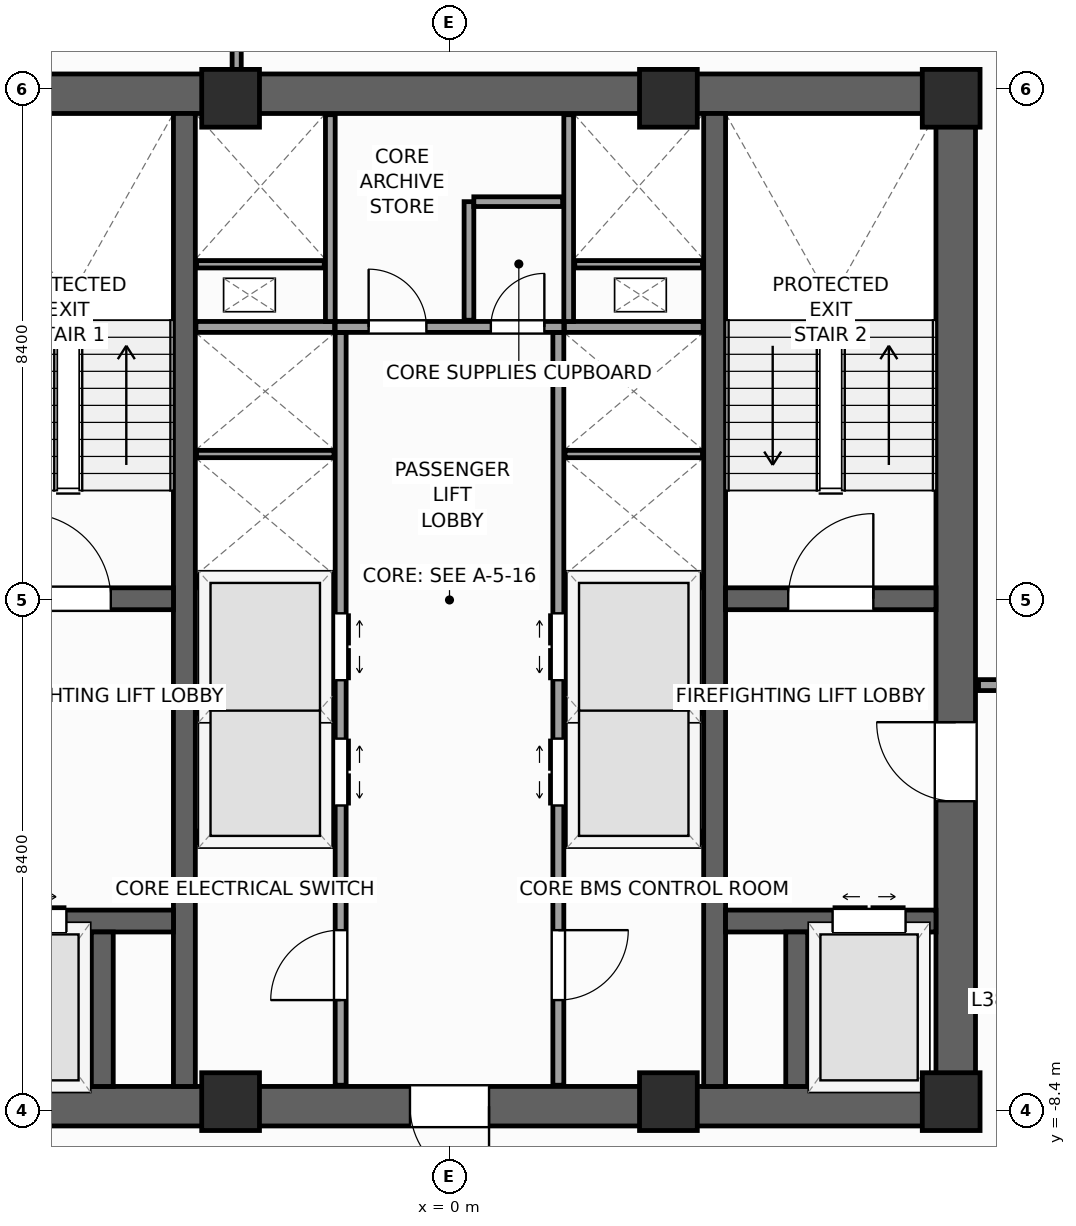
"""IFC4 building model, lengths in metres.
Left out: names, types, materials, properties, quantities, classifications, styles, units other than length and angle.
Written with IfcOpenShell. Run it as: python <this file> out.ifc"""

import sys

from ifc_helpers import new_model, si_unit, direction, frame, frame_2d, origin, origin_2d, place, context, subcontext, project, spatial, rectangle, extrude, source, transform, mapped, element, fill, save


model = new_model("IFC4")
c1 = context("Model", 3, precision=1e-05, world=origin(), true_north=direction((0.0, 1.0)))
c2 = subcontext(c1, "Body", "Model", "MODEL_VIEW")
j1 = project(units=[si_unit("LENGTHUNIT", "METRE"), si_unit("PLANEANGLEUNIT", "RADIAN")], contexts=[c1])
p1 = place(None, origin())
s1 = spatial("IfcSite", under=j1, at=p1, CompositionType="ELEMENT")
p2 = place(p1, origin())
s2 = spatial("IfcBuilding", under=s1, at=p2, CompositionType="ELEMENT")
p3 = place(p2, frame((0.0, 0.0, 160.4)))
s3 = spatial("IfcBuildingStorey", under=s2, at=p3, CompositionType="ELEMENT", Elevation=160.4)
p4 = place(p3, frame((-8.65, -8.325, 0.0), z_axis=(0.0, 0.0, 1.0), x_axis=(1.0, 0.0, 0.0)))
e1 = element("IfcWall", 1, at=p4, inside=s3, PredefinedType="SHEAR", context=c2, shape_type="SweptSolid", body=[
    extrude(rectangle(XDim=17.3, YDim=0.65, at=frame_2d((8.65, 0.0))), origin(), (0.0, 0.0, 1.0), 4.0),
])
p5 = place(p4, frame((8.0, 0.0, 0.0)))
e2 = element("IfcOpeningElement", 2, at=p5, cuts=e1, PredefinedType="OPENING", context=c2, shape_type="SweptSolid", body=[
    extrude(rectangle(XDim=1.3, YDim=2.2, at=frame_2d((0.65, 1.1))), frame((0.0, 0.335, 0.0), z_axis=(0.0, -1.0, 0.0), x_axis=(1.0, 0.0, 0.0)), (0.0, 0.0, 1.0), 0.67),
])
p6 = place(p3, frame((-8.65, 8.325, 0.0), z_axis=(0.0, 0.0, 1.0), x_axis=(1.0, 0.0, 0.0)))
e3 = element("IfcWall", 3, at=p6, inside=s3, PredefinedType="SHEAR", context=c2, shape_type="SweptSolid", body=[
    extrude(rectangle(XDim=17.3, YDim=0.65, at=frame_2d((8.65, 0.0))), origin(), (0.0, 0.0, 1.0), 4.0),
])
p7 = place(p3, frame((8.325, -8.0, 0.0), z_axis=(0.0, 0.0, 1.0), x_axis=(0.0, 1.0, 0.0)))
e4 = element("IfcWall", 4, at=p7, inside=s3, PredefinedType="SHEAR", context=c2, shape_type="SweptSolid", body=[
    extrude(rectangle(XDim=16.0, YDim=0.65, at=frame_2d((8.0, 0.0))), origin(), (0.0, 0.0, 1.0), 4.0),
])
p8 = place(p7, frame((4.69, 0.0, 0.0)))
e5 = element("IfcOpeningElement", 5, at=p8, cuts=e4, PredefinedType="OPENING", context=c2, shape_type="SweptSolid", body=[
    extrude(rectangle(XDim=1.3, YDim=2.2, at=frame_2d((0.65, 1.1))), frame((0.0, 0.335, 0.0), z_axis=(0.0, -1.0, 0.0), x_axis=(1.0, 0.0, 0.0)), (0.0, 0.0, 1.0), 0.67),
])
for number, where, z_axis, x_axis in (
    (6, (-4.36, -8.0, 0.0), (0.0, 0.0, 1.0), (0.0, 1.0, 0.0)),
    (7, (4.36, -8.0, 0.0), (0.0, 0.0, 1.0), (0.0, 1.0, 0.0)),
):
    element("IfcWall", number, at=place(p3, frame(where, z_axis=z_axis, x_axis=x_axis)), inside=s3, PredefinedType="SHEAR", context=c2, shape_type="SweptSolid", body=[
        extrude(rectangle(XDim=16.0, YDim=0.36, at=frame_2d((8.0, 0.0))), origin(), (0.0, 0.0, 1.0), 4.0),
    ])
p9 = place(p3, frame((-8.0, 0.02, 0.0), z_axis=(0.0, 0.0, 1.0), x_axis=(1.0, 0.0, 0.0)))
e8 = element("IfcWall", 8, at=p9, inside=s3, PredefinedType="SHEAR", context=c2, shape_type="SweptSolid", body=[
    extrude(rectangle(XDim=3.46, YDim=0.36, at=frame_2d((1.73, 0.0))), origin(), (0.0, 0.0, 1.0), 4.0),
])
p10 = place(p9, frame((1.03, 0.0, 0.0)))
e9 = element("IfcOpeningElement", 9, at=p10, cuts=e8, PredefinedType="OPENING", context=c2, shape_type="SweptSolid", body=[
    extrude(rectangle(XDim=1.4, YDim=2.2, at=frame_2d((0.7, 1.1))), frame((0.0, 0.19, 0.0), z_axis=(0.0, -1.0, 0.0), x_axis=(1.0, 0.0, 0.0)), (0.0, 0.0, 1.0), 0.38),
])
p11 = place(p3, frame((4.54, 0.02, 0.0), z_axis=(0.0, 0.0, 1.0), x_axis=(1.0, 0.0, 0.0)))
e10 = element("IfcWall", 10, at=p11, inside=s3, PredefinedType="SHEAR", context=c2, shape_type="SweptSolid", body=[
    extrude(rectangle(XDim=3.46, YDim=0.36, at=frame_2d((1.73, 0.0))), origin(), (0.0, 0.0, 1.0), 4.0),
])
p12 = place(p11, frame((1.03, 0.0, 0.0)))
e11 = element("IfcOpeningElement", 11, at=p12, cuts=e10, PredefinedType="OPENING", context=c2, shape_type="SweptSolid", body=[
    extrude(rectangle(XDim=1.4, YDim=2.2, at=frame_2d((0.7, 1.1))), frame((0.0, 0.19, 0.0), z_axis=(0.0, -1.0, 0.0), x_axis=(1.0, 0.0, 0.0)), (0.0, 0.0, 1.0), 0.38),
])
p13 = place(p3, frame((-8.0, -5.28, 0.0), z_axis=(0.0, 0.0, 1.0), x_axis=(1.0, 0.0, 0.0)))
e12 = element("IfcWall", 12, at=p13, inside=s3, PredefinedType="SHEAR", context=c2, shape_type="SweptSolid", body=[
    extrude(rectangle(XDim=3.46, YDim=0.36, at=frame_2d((1.73, 0.0))), origin(), (0.0, 0.0, 1.0), 4.0),
])
p14 = place(p13, frame((0.5, 0.0, 0.0)))
e13 = element("IfcOpeningElement", 13, at=p14, cuts=e12, PredefinedType="OPENING", context=c2, shape_type="SweptSolid", body=[
    extrude(rectangle(XDim=1.2, YDim=2.25, at=frame_2d((0.6, 1.125))), frame((0.0, 0.19, 0.0), z_axis=(0.0, -1.0, 0.0), x_axis=(1.0, 0.0, 0.0)), (0.0, 0.0, 1.0), 0.38),
])
p15 = place(p3, frame((4.54, -5.28, 0.0), z_axis=(0.0, 0.0, 1.0), x_axis=(1.0, 0.0, 0.0)))
e14 = element("IfcWall", 14, at=p15, inside=s3, PredefinedType="SHEAR", context=c2, shape_type="SweptSolid", body=[
    extrude(rectangle(XDim=3.46, YDim=0.36, at=frame_2d((1.73, 0.0))), origin(), (0.0, 0.0, 1.0), 4.0),
])
p16 = place(p15, frame((1.76, 0.0, 0.0)))
e15 = element("IfcOpeningElement", 15, at=p16, cuts=e14, PredefinedType="OPENING", context=c2, shape_type="SweptSolid", body=[
    extrude(rectangle(XDim=1.2, YDim=2.25, at=frame_2d((0.6, 1.125))), frame((0.0, 0.19, 0.0), z_axis=(0.0, -1.0, 0.0), x_axis=(1.0, 0.0, 0.0)), (0.0, 0.0, 1.0), 0.38),
])
for number, where, z_axis, x_axis in (
    (16, (-5.71, -8.0, 0.0), (0.0, 0.0, 1.0), (0.0, 1.0, 0.0)),
    (17, (5.71, -8.0, 0.0), (0.0, 0.0, 1.0), (0.0, 1.0, 0.0)),
):
    element("IfcWall", number, at=place(p3, frame(where, z_axis=z_axis, x_axis=x_axis)), inside=s3, PredefinedType="SHEAR", context=c2, shape_type="SweptSolid", body=[
        extrude(rectangle(XDim=2.54, YDim=0.36, at=frame_2d((1.27, 0.0))), origin(), (0.0, 0.0, 1.0), 4.0),
    ])
m1 = source(origin(), c2, "Body", "SweptSolid", [
    extrude(rectangle(XDim=0.95, YDim=0.95, at=origin_2d()), origin(), (0.0, 0.0, 1.0), 4.0),
])
for number, where, z_axis, x_axis in (
    (18, (8.25, -8.25, 0.0), (0.0, 0.0, 1.0), (1.0, 0.0, 0.0)),
    (19, (8.25, 8.25, 0.0), (0.0, 0.0, 1.0), (1.0, 0.0, 0.0)),
    (20, (-3.6, -8.25, 0.0), (0.0, 0.0, 1.0), (1.0, 0.0, 0.0)),
    (21, (3.6, -8.25, 0.0), (0.0, 0.0, 1.0), (1.0, 0.0, 0.0)),
    (22, (-3.6, 8.25, 0.0), (0.0, 0.0, 1.0), (1.0, 0.0, 0.0)),
    (23, (3.6, 8.25, 0.0), (0.0, 0.0, 1.0), (1.0, 0.0, 0.0)),
):
    element("IfcColumn", number, at=place(p3, frame(where, z_axis=z_axis, x_axis=x_axis)), inside=s3, PredefinedType="PILASTER", context=c2, shape_type="MappedRepresentation", body=[
        mapped(m1, transform((0.0, 0.0, 0.0), scale=1.0)),
    ])
p17 = place(p3, frame((-1.79, -7.98, 0.0), z_axis=(0.0, 0.0, 1.0), x_axis=(0.0, 1.0, 0.0)))
e24 = element("IfcWall", 24, at=p17, inside=s3, PredefinedType="PARTITIONING", context=c2, shape_type="SweptSolid", body=[
    extrude(rectangle(XDim=12.38, YDim=0.18, at=frame_2d((6.19, 0.0))), origin(), (0.0, 0.0, 1.0), 3.74),
])
p18 = place(p17, frame((4.6, 0.0, 0.0)))
e25 = element("IfcOpeningElement", 25, at=p18, cuts=e24, PredefinedType="OPENING", context=c2, shape_type="SweptSolid", body=[
    extrude(rectangle(XDim=1.1, YDim=2.2, at=frame_2d((0.55, 1.1))), frame((0.0, 0.1, 0.0), z_axis=(0.0, -1.0, 0.0), x_axis=(1.0, 0.0, 0.0)), (0.0, 0.0, 1.0), 0.2),
])
p19 = place(p17, frame((6.66, 0.0, 0.0)))
e26 = element("IfcOpeningElement", 26, at=p19, cuts=e24, PredefinedType="OPENING", context=c2, shape_type="SweptSolid", body=[
    extrude(rectangle(XDim=1.1, YDim=2.2, at=frame_2d((0.55, 1.1))), frame((0.0, 0.1, 0.0), z_axis=(0.0, -1.0, 0.0), x_axis=(1.0, 0.0, 0.0)), (0.0, 0.0, 1.0), 0.2),
])
p20 = place(p17, frame((1.4, 0.0, 0.0)))
e27 = element("IfcOpeningElement", 27, at=p20, cuts=e24, PredefinedType="OPENING", context=c2, shape_type="SweptSolid", body=[
    extrude(rectangle(XDim=1.15, YDim=2.25, at=frame_2d((0.575, 1.125))), frame((0.0, 0.1, 0.0), z_axis=(0.0, -1.0, 0.0), x_axis=(1.0, 0.0, 0.0)), (0.0, 0.0, 1.0), 0.2),
])
p21 = place(p3, frame((1.79, -7.98, 0.0), z_axis=(0.0, 0.0, 1.0), x_axis=(0.0, 1.0, 0.0)))
e28 = element("IfcWall", 28, at=p21, inside=s3, PredefinedType="PARTITIONING", context=c2, shape_type="SweptSolid", body=[
    extrude(rectangle(XDim=12.38, YDim=0.18, at=frame_2d((6.19, 0.0))), origin(), (0.0, 0.0, 1.0), 3.74),
])
p22 = place(p21, frame((4.6, 0.0, 0.0)))
e29 = element("IfcOpeningElement", 29, at=p22, cuts=e28, PredefinedType="OPENING", context=c2, shape_type="SweptSolid", body=[
    extrude(rectangle(XDim=1.1, YDim=2.2, at=frame_2d((0.55, 1.1))), frame((0.0, 0.1, 0.0), z_axis=(0.0, -1.0, 0.0), x_axis=(1.0, 0.0, 0.0)), (0.0, 0.0, 1.0), 0.2),
])
p23 = place(p21, frame((6.66, 0.0, 0.0)))
e30 = element("IfcOpeningElement", 30, at=p23, cuts=e28, PredefinedType="OPENING", context=c2, shape_type="SweptSolid", body=[
    extrude(rectangle(XDim=1.1, YDim=2.2, at=frame_2d((0.55, 1.1))), frame((0.0, 0.1, 0.0), z_axis=(0.0, -1.0, 0.0), x_axis=(1.0, 0.0, 0.0)), (0.0, 0.0, 1.0), 0.2),
])
p24 = place(p21, frame((1.4, 0.0, 0.0)))
e31 = element("IfcOpeningElement", 31, at=p24, cuts=e28, PredefinedType="OPENING", context=c2, shape_type="SweptSolid", body=[
    extrude(rectangle(XDim=1.15, YDim=2.25, at=frame_2d((0.575, 1.125))), frame((0.0, 0.1, 0.0), z_axis=(0.0, -1.0, 0.0), x_axis=(1.0, 0.0, 0.0)), (0.0, 0.0, 1.0), 0.2),
])
p25 = place(p3, frame((-1.88, 4.49, 0.0), z_axis=(0.0, 0.0, 1.0), x_axis=(1.0, 0.0, 0.0)))
e32 = element("IfcWall", 32, at=p25, inside=s3, PredefinedType="PARTITIONING", context=c2, shape_type="SweptSolid", body=[
    extrude(rectangle(XDim=3.76, YDim=0.18, at=frame_2d((1.88, 0.0))), origin(), (0.0, 0.0, 1.0), 3.74),
])
p26 = place(p25, frame((0.55, 0.0, 0.0)))
e33 = element("IfcOpeningElement", 33, at=p26, cuts=e32, PredefinedType="OPENING", context=c2, shape_type="SweptSolid", body=[
    extrude(rectangle(XDim=0.95, YDim=2.1, at=frame_2d((0.475, 1.05))), frame((0.0, 0.1, 0.0), z_axis=(0.0, -1.0, 0.0), x_axis=(1.0, 0.0, 0.0)), (0.0, 0.0, 1.0), 0.2),
])
p27 = place(p25, frame((2.56, 0.0, 0.0)))
e34 = element("IfcOpeningElement", 34, at=p27, cuts=e32, PredefinedType="OPENING", context=c2, shape_type="SweptSolid", body=[
    extrude(rectangle(XDim=0.88, YDim=2.1, at=frame_2d((0.44, 1.05))), frame((0.0, 0.1, 0.0), z_axis=(0.0, -1.0, 0.0), x_axis=(1.0, 0.0, 0.0)), (0.0, 0.0, 1.0), 0.2),
])
for number, where, z_axis, x_axis in (
    (35, (-4.17, -3.9, 0.0), (0.0, 0.0, 1.0), (1.0, 0.0, 0.0)),
    (36, (1.89, -3.9, 0.0), (0.0, 0.0, 1.0), (1.0, 0.0, 0.0)),
    (37, (-4.17, 0.3, 0.0), (0.0, 0.0, 1.0), (1.0, 0.0, 0.0)),
    (38, (1.89, 0.3, 0.0), (0.0, 0.0, 1.0), (1.0, 0.0, 0.0)),
    (39, (-4.17, 4.49, 0.0), (0.0, 0.0, 1.0), (1.0, 0.0, 0.0)),
    (40, (1.89, 4.49, 0.0), (0.0, 0.0, 1.0), (1.0, 0.0, 0.0)),
):
    element("IfcWall", number, at=place(p3, frame(where, z_axis=z_axis, x_axis=x_axis)), inside=s3, PredefinedType="PARTITIONING", context=c2, shape_type="SweptSolid", body=[
        extrude(rectangle(XDim=2.28, YDim=0.18, at=frame_2d((1.14, 0.0))), origin(), (0.0, 0.0, 1.0), 3.74),
    ])
for number, where, z_axis, x_axis in (
    (41, (-4.16, -1.8, 0.0), (0.0, 0.0, 1.0), (1.0, 0.0, 0.0)),
    (42, (1.9, -1.8, 0.0), (0.0, 0.0, 1.0), (1.0, 0.0, 0.0)),
    (43, (-4.16, 2.4, 0.0), (0.0, 0.0, 1.0), (1.0, 0.0, 0.0)),
    (44, (1.9, 2.4, 0.0), (0.0, 0.0, 1.0), (1.0, 0.0, 0.0)),
):
    element("IfcWall", number, at=place(p3, frame(where, z_axis=z_axis, x_axis=x_axis)), inside=s3, PredefinedType="PARTITIONING", context=c2, shape_type="SweptSolid", body=[
        extrude(rectangle(XDim=2.26, YDim=0.12, at=frame_2d((1.13, 0.0))), origin(), (0.0, 0.0, 1.0), 3.74),
    ])
for number, where, z_axis, x_axis in (
    (45, (-1.96, 4.58, 0.0), (0.0, 0.0, 1.0), (0.0, 1.0, 0.0)),
    (46, (1.96, 4.58, 0.0), (0.0, 0.0, 1.0), (0.0, 1.0, 0.0)),
):
    element("IfcWall", number, at=place(p3, frame(where, z_axis=z_axis, x_axis=x_axis)), inside=s3, PredefinedType="PARTITIONING", context=c2, shape_type="SweptSolid", body=[
        extrude(rectangle(XDim=3.4, YDim=0.16, at=frame_2d((1.7, 0.0))), origin(), (0.0, 0.0, 1.0), 3.74),
    ])
for number, where, z_axis, x_axis in (
    (47, (-4.16, 5.52, 0.0), (0.0, 0.0, 1.0), (1.0, 0.0, 0.0)),
    (48, (2.06, 5.52, 0.0), (0.0, 0.0, 1.0), (1.0, 0.0, 0.0)),
):
    element("IfcWall", number, at=place(p3, frame(where, z_axis=z_axis, x_axis=x_axis)), inside=s3, PredefinedType="PARTITIONING", context=c2, shape_type="SweptSolid", body=[
        extrude(rectangle(XDim=2.1, YDim=0.12, at=frame_2d((1.05, 0.0))), origin(), (0.0, 0.0, 1.0), 3.74),
    ])
p28 = place(p3, frame((0.32, 4.6, 0.0), z_axis=(0.0, 0.0, 1.0), x_axis=(0.0, 1.0, 0.0)))
e49 = element("IfcWall", 49, at=p28, inside=s3, PredefinedType="PARTITIONING", context=c2, shape_type="SweptSolid", body=[
    extrude(rectangle(XDim=1.95, YDim=0.16, at=frame_2d((0.975, 0.0))), origin(), (0.0, 0.0, 1.0), 3.74),
])
p29 = place(p3, frame((0.4, 6.55, 0.0), z_axis=(0.0, 0.0, 1.0), x_axis=(1.0, 0.0, 0.0)))
e50 = element("IfcWall", 50, at=p29, inside=s3, PredefinedType="PARTITIONING", context=c2, shape_type="SweptSolid", body=[
    extrude(rectangle(XDim=1.46, YDim=0.16, at=frame_2d((0.73, 0.0))), origin(), (0.0, 0.0, 1.0), 3.74),
])
p30 = place(p3, frame((8.7, -1.4, 0.0), z_axis=(0.0, 0.0, 1.0), x_axis=(1.0, 0.0, 0.0)))
e51 = element("IfcWall", 51, at=p30, inside=s3, PredefinedType="PARTITIONING", context=c2, shape_type="SweptSolid", body=[
    extrude(rectangle(XDim=1.75, YDim=0.18, at=frame_2d((0.875, 0.0))), origin(), (0.0, 0.0, 1.0), 3.74),
])
p31 = place(p30, frame((0.325, 0.0, 0.0)))
e52 = element("IfcOpeningElement", 52, at=p31, cuts=e51, PredefinedType="OPENING", context=c2, shape_type="SweptSolid", body=[
    extrude(rectangle(XDim=1.1, YDim=2.2, at=frame_2d((0.55, 1.1))), frame((0.0, 0.1, 0.0), z_axis=(0.0, -1.0, 0.0), x_axis=(1.0, 0.0, 0.0)), (0.0, 0.0, 1.0), 0.2),
])
p32 = place(p3, frame((-3.5, 8.655, 0.0), z_axis=(0.0, 0.0, 1.0), x_axis=(0.0, 1.0, 0.0)))
e53 = element("IfcWall", 53, at=p32, inside=s3, PredefinedType="PARTITIONING", context=c2, shape_type="SweptSolid", body=[
    extrude(rectangle(XDim=19.411, YDim=0.15, at=frame_2d((9.706, 0.0))), origin(), (0.0, 0.0, 1.0), 3.74),
])
m2 = source(origin(), c2, "Body", "SweptSolid", [
    extrude(rectangle(XDim=1.4, YDim=2.2, at=frame_2d((0.7, 1.1))), frame((0.0, 0.025, 0.0), z_axis=(0.0, -1.0, 0.0), x_axis=(1.0, 0.0, 0.0)), (0.0, 0.0, 1.0), 0.05),
])
p33 = place(p10, origin())
e54 = element("IfcDoor", 54, at=p33, inside=s3, OperationType="SINGLE_SWING_LEFT", PredefinedType="DOOR", context=c2, shape_type="MappedRepresentation", body=[
    mapped(m2, transform((0.0, 0.0, 0.0), scale=1.0)),
])
fill(e9, e54)
p34 = place(p12, origin())
e55 = element("IfcDoor", 55, at=p34, inside=s3, OperationType="SINGLE_SWING_RIGHT", PredefinedType="DOOR", context=c2, shape_type="MappedRepresentation", body=[
    mapped(m2, transform((0.0, 0.0, 0.0), scale=1.0)),
])
fill(e11, e55)
m3 = source(origin(), c2, "Body", "SweptSolid", [
    extrude(rectangle(XDim=1.3, YDim=2.2, at=frame_2d((0.65, 1.1))), frame((0.0, 0.025, 0.0), z_axis=(0.0, -1.0, 0.0), x_axis=(1.0, 0.0, 0.0)), (0.0, 0.0, 1.0), 0.05),
])
p35 = place(p8, origin())
e56 = element("IfcDoor", 56, at=p35, inside=s3, OperationType="SINGLE_SWING_RIGHT", PredefinedType="DOOR", context=c2, shape_type="MappedRepresentation", body=[
    mapped(m3, transform((0.0, 0.0, 0.0), scale=1.0)),
])
fill(e5, e56)
p36 = place(p5, frame((1.3, 0.0, 0.0), z_axis=(0.0, 0.0, 1.0), x_axis=(-1.0, 0.0, 0.0)))
e57 = element("IfcDoor", 57, at=p36, inside=s3, OperationType="SINGLE_SWING_RIGHT", PredefinedType="DOOR", context=c2, shape_type="MappedRepresentation", body=[
    mapped(m3, transform((0.0, 0.0, 0.0), scale=1.0)),
])
fill(e2, e57)
m4 = source(origin(), c2, "Body", "SweptSolid", [
    extrude(rectangle(XDim=1.2, YDim=2.25, at=frame_2d((0.6, 1.125))), frame((0.0, 0.025, 0.0), z_axis=(0.0, -1.0, 0.0), x_axis=(1.0, 0.0, 0.0)), (0.0, 0.0, 1.0), 0.05),
])
p37 = place(p14, origin())
e58 = element("IfcDoor", 58, at=p37, inside=s3, OperationType="DOUBLE_DOOR_SLIDING", PredefinedType="DOOR", context=c2, shape_type="MappedRepresentation", body=[
    mapped(m4, transform((0.0, 0.0, 0.0), scale=1.0)),
])
fill(e13, e58)
p38 = place(p16, origin())
e59 = element("IfcDoor", 59, at=p38, inside=s3, OperationType="DOUBLE_DOOR_SLIDING", PredefinedType="DOOR", context=c2, shape_type="MappedRepresentation", body=[
    mapped(m4, transform((0.0, 0.0, 0.0), scale=1.0)),
])
fill(e15, e59)
m5 = source(origin(), c2, "Body", "SweptSolid", [
    extrude(rectangle(XDim=1.1, YDim=2.2, at=frame_2d((0.55, 1.1))), frame((0.0, 0.025, 0.0), z_axis=(0.0, -1.0, 0.0), x_axis=(1.0, 0.0, 0.0)), (0.0, 0.0, 1.0), 0.05),
])
p39 = place(p18, frame((1.1, 0.0, 0.0), z_axis=(0.0, 0.0, 1.0), x_axis=(-1.0, 0.0, 0.0)))
e60 = element("IfcDoor", 60, at=p39, inside=s3, OperationType="DOUBLE_DOOR_SLIDING", PredefinedType="DOOR", context=c2, shape_type="MappedRepresentation", body=[
    mapped(m5, transform((0.0, 0.0, 0.0), scale=1.0)),
])
fill(e25, e60)
p40 = place(p19, frame((1.1, 0.0, 0.0), z_axis=(0.0, 0.0, 1.0), x_axis=(-1.0, 0.0, 0.0)))
e61 = element("IfcDoor", 61, at=p40, inside=s3, OperationType="DOUBLE_DOOR_SLIDING", PredefinedType="DOOR", context=c2, shape_type="MappedRepresentation", body=[
    mapped(m5, transform((0.0, 0.0, 0.0), scale=1.0)),
])
fill(e26, e61)
p41 = place(p22, origin())
e62 = element("IfcDoor", 62, at=p41, inside=s3, OperationType="DOUBLE_DOOR_SLIDING", PredefinedType="DOOR", context=c2, shape_type="MappedRepresentation", body=[
    mapped(m5, transform((0.0, 0.0, 0.0), scale=1.0)),
])
fill(e29, e62)
p42 = place(p23, origin())
e63 = element("IfcDoor", 63, at=p42, inside=s3, OperationType="DOUBLE_DOOR_SLIDING", PredefinedType="DOOR", context=c2, shape_type="MappedRepresentation", body=[
    mapped(m5, transform((0.0, 0.0, 0.0), scale=1.0)),
])
fill(e30, e63)
m6 = source(origin(), c2, "Body", "SweptSolid", [
    extrude(rectangle(XDim=1.15, YDim=2.25, at=frame_2d((0.575, 1.125))), frame((0.0, 0.025, 0.0), z_axis=(0.0, -1.0, 0.0), x_axis=(1.0, 0.0, 0.0)), (0.0, 0.0, 1.0), 0.05),
])
p43 = place(p20, origin())
e64 = element("IfcDoor", 64, at=p43, inside=s3, OperationType="SINGLE_SWING_LEFT", PredefinedType="DOOR", context=c2, shape_type="MappedRepresentation", body=[
    mapped(m6, transform((0.0, 0.0, 0.0), scale=1.0)),
])
fill(e27, e64)
p44 = place(p24, frame((1.15, 0.0, 0.0), z_axis=(0.0, 0.0, 1.0), x_axis=(-1.0, 0.0, 0.0)))
e65 = element("IfcDoor", 65, at=p44, inside=s3, OperationType="SINGLE_SWING_RIGHT", PredefinedType="DOOR", context=c2, shape_type="MappedRepresentation", body=[
    mapped(m6, transform((0.0, 0.0, 0.0), scale=1.0)),
])
fill(e31, e65)
m7 = source(origin(), c2, "Body", "SweptSolid", [
    extrude(rectangle(XDim=0.95, YDim=2.1, at=frame_2d((0.475, 1.05))), frame((0.0, 0.025, 0.0), z_axis=(0.0, -1.0, 0.0), x_axis=(1.0, 0.0, 0.0)), (0.0, 0.0, 1.0), 0.05),
])
p45 = place(p26, origin())
e66 = element("IfcDoor", 66, at=p45, inside=s3, OperationType="SINGLE_SWING_LEFT", PredefinedType="DOOR", context=c2, shape_type="MappedRepresentation", body=[
    mapped(m7, transform((0.0, 0.0, 0.0), scale=1.0)),
])
fill(e33, e66)
m8 = source(origin(), c2, "Body", "SweptSolid", [
    extrude(rectangle(XDim=0.88, YDim=2.1, at=frame_2d((0.44, 1.05))), frame((0.0, 0.025, 0.0), z_axis=(0.0, -1.0, 0.0), x_axis=(1.0, 0.0, 0.0)), (0.0, 0.0, 1.0), 0.05),
])
p46 = place(p27, origin())
e67 = element("IfcDoor", 67, at=p46, inside=s3, OperationType="SINGLE_SWING_RIGHT", PredefinedType="DOOR", context=c2, shape_type="MappedRepresentation", body=[
    mapped(m8, transform((0.0, 0.0, 0.0), scale=1.0)),
])
fill(e34, e67)
save(model, sys.argv[1])
